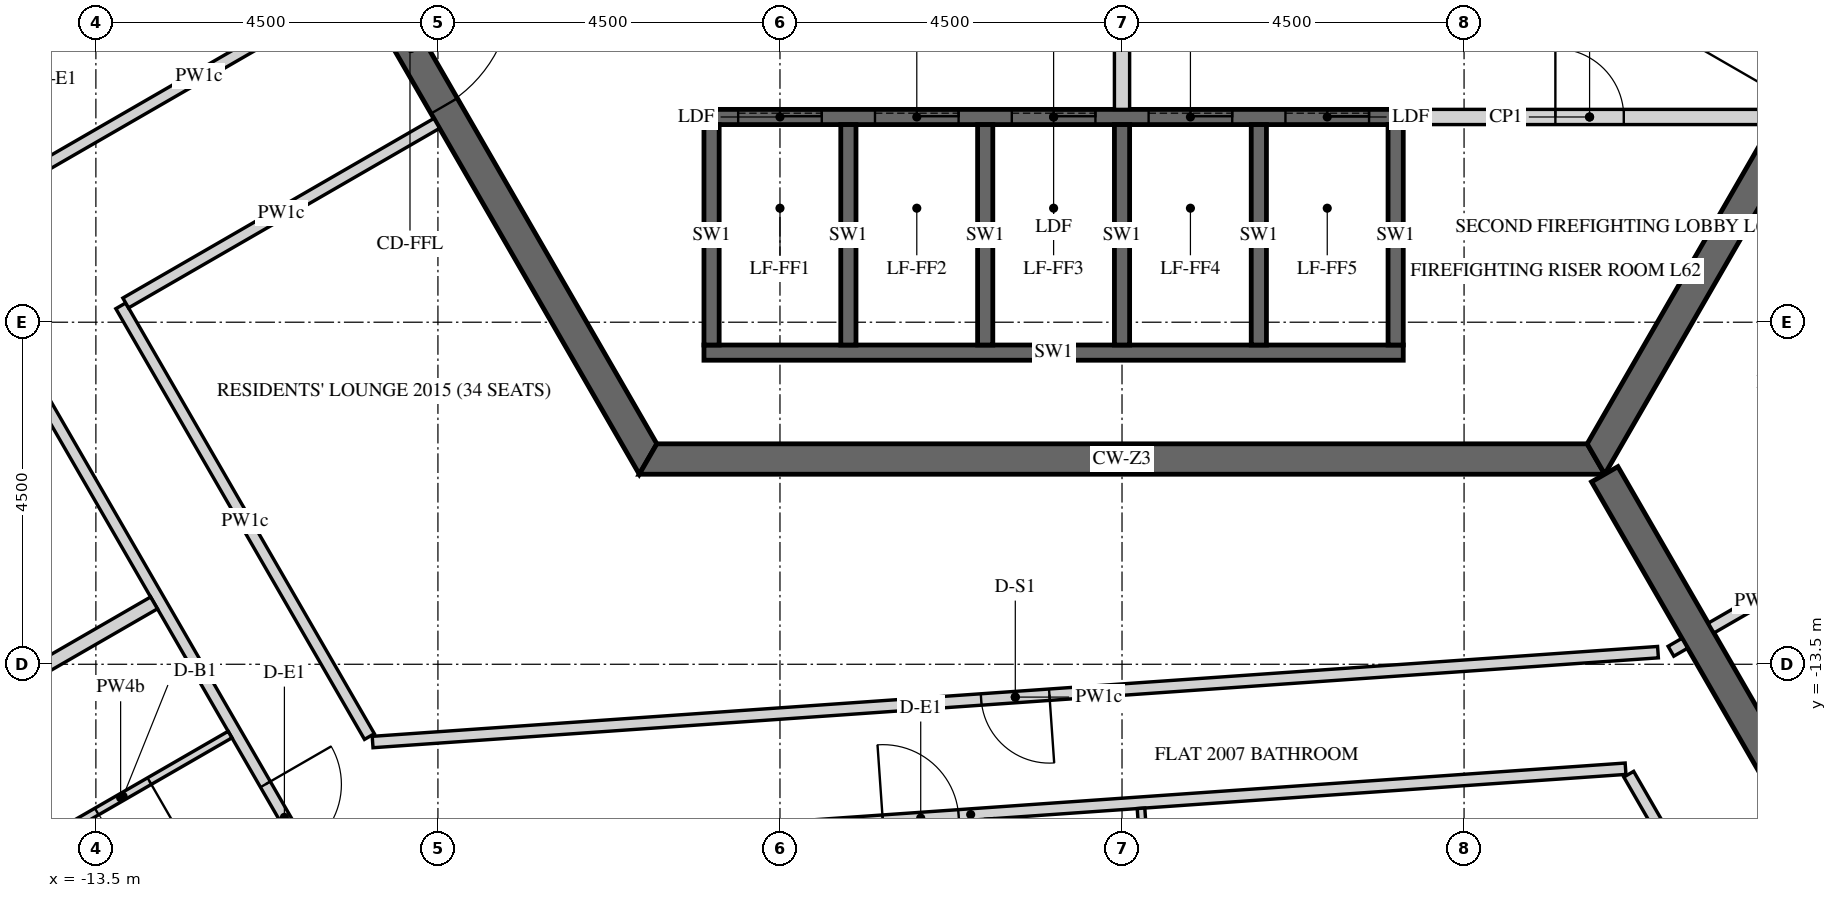
"""IFC4 building model, lengths in metres.
Left out: names, types, materials, properties, quantities, classifications, styles, units other than length and angle.
Written with IfcOpenShell. Run it as: python <this file> out.ifc"""

import sys

from ifc_helpers import new_model, si_unit, direction, frame, frame_2d, origin, place, context, subcontext, project, spatial, polyline, rectangle, outline, extrude, element, fill, save


model = new_model("IFC4")
c1 = context("Model", 3, precision=1e-05, world=origin(), true_north=direction((0.0, 1.0)))
c2 = subcontext(c1, "Body", "Model", "MODEL_VIEW")
j1 = project(units=[si_unit("LENGTHUNIT", "METRE"), si_unit("PLANEANGLEUNIT", "RADIAN")], contexts=[c1])
p1 = place(None, origin())
s1 = spatial("IfcSite", under=j1, at=p1, CompositionType="ELEMENT")
p2 = place(p1, origin())
s2 = spatial("IfcBuilding", under=s1, at=p2, CompositionType="ELEMENT")
p3 = place(p2, frame((0.0, 0.0, 260.1)))
s3 = spatial("IfcBuildingStorey", under=s2, at=p3, CompositionType="ELEMENT", Elevation=260.1)
p4 = place(p3, frame((-12.471, 0.0, -0.15), z_axis=(0.0, 0.0, 1.0), x_axis=(0.499996419489, -0.866027470984, 0.0)))
e1 = element("IfcWall", 1, at=p4, inside=s3, PredefinedType="SHEAR", context=c2, shape_type="SweptSolid", body=[
    extrude(outline(polyline([(-0.115, -0.2), (12.586, -0.2), (12.355, 0.2), (0.115, 0.2), (-0.115, -0.2)])), origin(), (0.0, 0.0, 1.0), 3.9),
])
p5 = place(p4, frame((5.306, 0.0, 0.15)))
e2 = element("IfcOpeningElement", 2, at=p5, cuts=e1, PredefinedType="OPENING", context=c2, shape_type="SweptSolid", body=[
    extrude(rectangle(XDim=1.8, YDim=2.4, at=frame_2d((0.9, 1.2))), frame((0.0, 0.21, 0.0), z_axis=(0.0, -1.0, 0.0), x_axis=(1.0, 0.0, 0.0)), (0.0, 0.0, 1.0), 0.42),
])
p6 = place(p3, frame((-6.235, -10.8, -0.15), z_axis=(0.0, 0.0, 1.0), x_axis=(1.0, 0.0, 0.0)))
e3 = element("IfcWall", 3, at=p6, inside=s3, PredefinedType="SHEAR", context=c2, shape_type="SweptSolid", body=[
    extrude(outline(polyline([(-0.115, -0.2), (12.586, -0.2), (12.355, 0.2), (0.115, 0.2), (-0.115, -0.2)])), origin(), (0.0, 0.0, 1.0), 3.9),
])
p7 = place(p3, frame((6.235, -10.8, -0.15), z_axis=(0.0, 0.0, 1.0), x_axis=(0.499996419489, 0.866027470984, 0.0)))
e4 = element("IfcWall", 4, at=p7, inside=s3, PredefinedType="SHEAR", context=c2, shape_type="SweptSolid", body=[
    extrude(outline(polyline([(-0.115, -0.2), (12.586, -0.2), (12.355, 0.2), (0.115, 0.2), (-0.115, -0.2)])), origin(), (0.0, 0.0, 1.0), 3.9),
])
p8 = place(p7, frame((5.364, 0.0, 0.15)))
e5 = element("IfcOpeningElement", 5, at=p8, cuts=e4, PredefinedType="OPENING", context=c2, shape_type="SweptSolid", body=[
    extrude(rectangle(XDim=1.8, YDim=2.4, at=frame_2d((0.9, 1.2))), frame((0.0, 0.21, 0.0), z_axis=(0.0, -1.0, 0.0), x_axis=(1.0, 0.0, 0.0)), (0.0, 0.0, 1.0), 0.42),
])
p9 = place(p3, frame((6.351, -11.0, -0.15), z_axis=(0.0, 0.0, 1.0), x_axis=(0.499998894578, -0.866026041999, 0.0)))
e6 = element("IfcWall", 6, at=p9, inside=s3, PredefinedType="SHEAR", context=c2, shape_type="SweptSolid", body=[
    extrude(rectangle(XDim=15.544, YDim=0.4, at=frame_2d((7.772, 0.0))), origin(), (0.0, 0.0, 1.0), 3.9),
])
p10 = place(p9, frame((6.872, 0.0, 0.15)))
e7 = element("IfcOpeningElement", 7, at=p10, cuts=e6, PredefinedType="OPENING", context=c2, shape_type="SweptSolid", body=[
    extrude(rectangle(XDim=1.8, YDim=2.4, at=frame_2d((0.9, 1.2))), frame((0.0, 0.21, 0.0), z_axis=(0.0, -1.0, 0.0), x_axis=(1.0, 0.0, 0.0)), (0.0, 0.0, 1.0), 0.42),
])
p11 = place(p3, frame((-5.5, -6.3, -0.25), z_axis=(0.0, 0.0, 1.0), x_axis=(1.0, 0.0, 0.0)))
e8 = element("IfcWall", 8, at=p11, inside=s3, PredefinedType="SHEAR", context=c2, shape_type="SweptSolid", body=[
    extrude(rectangle(XDim=9.2, YDim=0.2, at=frame_2d((4.6, 0.0))), origin(), (0.0, 0.0, 1.0), 3.9),
])
p12 = place(p11, frame((0.45, 0.0, 0.25)))
e9 = element("IfcOpeningElement", 9, at=p12, cuts=e8, PredefinedType="OPENING", context=c2, shape_type="SweptSolid", body=[
    extrude(rectangle(XDim=1.1, YDim=2.1, at=frame_2d((0.55, 1.05))), frame((0.0, 0.11, 0.0), z_axis=(0.0, -1.0, 0.0), x_axis=(1.0, 0.0, 0.0)), (0.0, 0.0, 1.0), 0.22),
])
p13 = place(p11, frame((2.25, 0.0, 0.25)))
e10 = element("IfcOpeningElement", 10, at=p13, cuts=e8, PredefinedType="OPENING", context=c2, shape_type="SweptSolid", body=[
    extrude(rectangle(XDim=1.1, YDim=2.1, at=frame_2d((0.55, 1.05))), frame((0.0, 0.11, 0.0), z_axis=(0.0, -1.0, 0.0), x_axis=(1.0, 0.0, 0.0)), (0.0, 0.0, 1.0), 0.22),
])
p14 = place(p11, frame((4.05, 0.0, 0.25)))
e11 = element("IfcOpeningElement", 11, at=p14, cuts=e8, PredefinedType="OPENING", context=c2, shape_type="SweptSolid", body=[
    extrude(rectangle(XDim=1.1, YDim=2.1, at=frame_2d((0.55, 1.05))), frame((0.0, 0.11, 0.0), z_axis=(0.0, -1.0, 0.0), x_axis=(1.0, 0.0, 0.0)), (0.0, 0.0, 1.0), 0.22),
])
p15 = place(p11, frame((5.85, 0.0, 0.25)))
e12 = element("IfcOpeningElement", 12, at=p15, cuts=e8, PredefinedType="OPENING", context=c2, shape_type="SweptSolid", body=[
    extrude(rectangle(XDim=1.1, YDim=2.1, at=frame_2d((0.55, 1.05))), frame((0.0, 0.11, 0.0), z_axis=(0.0, -1.0, 0.0), x_axis=(1.0, 0.0, 0.0)), (0.0, 0.0, 1.0), 0.22),
])
p16 = place(p11, frame((7.65, 0.0, 0.25)))
e13 = element("IfcOpeningElement", 13, at=p16, cuts=e8, PredefinedType="OPENING", context=c2, shape_type="SweptSolid", body=[
    extrude(rectangle(XDim=1.1, YDim=2.1, at=frame_2d((0.55, 1.05))), frame((0.0, 0.11, 0.0), z_axis=(0.0, -1.0, 0.0), x_axis=(1.0, 0.0, 0.0)), (0.0, 0.0, 1.0), 0.22),
])
p17 = place(p3, frame((-5.5, -9.4, -0.25), z_axis=(0.0, 0.0, 1.0), x_axis=(1.0, 0.0, 0.0)))
e14 = element("IfcWall", 14, at=p17, inside=s3, PredefinedType="SHEAR", context=c2, shape_type="SweptSolid", body=[
    extrude(rectangle(XDim=9.2, YDim=0.2, at=frame_2d((4.6, 0.0))), origin(), (0.0, 0.0, 1.0), 3.9),
])
for number, where, z_axis, x_axis in (
    (15, (-5.4, -9.3, -0.25), (0.0, 0.0, 1.0), (0.0, 1.0, 0.0)),
    (16, (-3.6, -9.3, -0.25), (0.0, 0.0, 1.0), (0.0, 1.0, 0.0)),
    (17, (-1.8, -9.3, -0.25), (0.0, 0.0, 1.0), (0.0, 1.0, 0.0)),
    (18, (0.0, -9.3, -0.25), (0.0, 0.0, 1.0), (0.0, 1.0, 0.0)),
    (19, (1.8, -9.3, -0.25), (0.0, 0.0, 1.0), (0.0, 1.0, 0.0)),
    (20, (3.6, -9.3, -0.25), (0.0, 0.0, 1.0), (0.0, 1.0, 0.0)),
):
    element("IfcWall", number, at=place(p3, frame(where, z_axis=z_axis, x_axis=x_axis)), inside=s3, PredefinedType="SHEAR", context=c2, shape_type="SweptSolid", body=[
        extrude(rectangle(XDim=2.9, YDim=0.2, at=frame_2d((1.45, 0.0))), origin(), (0.0, 0.0, 1.0), 3.9),
    ])
p18 = place(p3, frame((0.0, -6.2, 0.0), z_axis=(0.0, 0.0, 1.0), x_axis=(0.0, 1.0, 0.0)))
e21 = element("IfcWall", 21, at=p18, inside=s3, PredefinedType="PARTITIONING", context=c2, shape_type="SweptSolid", body=[
    extrude(rectangle(XDim=6.1, YDim=0.2, at=frame_2d((3.05, 0.0))), origin(), (0.0, 0.0, 1.0), 3.65),
])
p19 = place(p3, frame((3.7, -6.3, 0.0), z_axis=(0.0, 0.0, 1.0), x_axis=(1.0, 0.0, 0.0)))
e22 = element("IfcWall", 22, at=p19, inside=s3, PredefinedType="PARTITIONING", context=c2, shape_type="SweptSolid", body=[
    extrude(rectangle(XDim=4.903, YDim=0.2, at=frame_2d((2.451, 0.0))), origin(), (0.0, 0.0, 1.0), 3.65),
])
p20 = place(p19, frame((2.001, 0.0, 0.0)))
e23 = element("IfcOpeningElement", 23, at=p20, cuts=e22, PredefinedType="OPENING", context=c2, shape_type="SweptSolid", body=[
    extrude(rectangle(XDim=0.9, YDim=2.1, at=frame_2d((0.45, 1.05))), frame((0.0, 0.11, 0.0), z_axis=(0.0, -1.0, 0.0), x_axis=(1.0, 0.0, 0.0)), (0.0, 0.0, 1.0), 0.22),
])
p21 = place(p3, frame((-18.338, -2.838, 0.0), z_axis=(0.0, 0.0, 1.0), x_axis=(0.499999693481, -0.866025580753, 0.0)))
e24 = element("IfcWall", 24, at=p21, inside=s3, PredefinedType="PARTITIONING", context=c2, shape_type="SweptSolid", body=[
    extrude(rectangle(XDim=15.296, YDim=0.15, at=frame_2d((7.648, 0.0))), origin(), (0.0, 0.0, 1.0), 2.823),
])
p22 = place(p21, frame((2.925, 0.0, 0.0)))
e25 = element("IfcOpeningElement", 25, at=p22, cuts=e24, PredefinedType="OPENING", context=c2, shape_type="SweptSolid", body=[
    extrude(rectangle(XDim=1.0, YDim=2.1, at=frame_2d((0.5, 1.05))), frame((0.0, 0.085, 0.0), z_axis=(0.0, -1.0, 0.0), x_axis=(1.0, 0.0, 0.0)), (0.0, 0.0, 1.0), 0.17),
])
p23 = place(p21, frame((14.136, 0.0, 0.0)))
e26 = element("IfcOpeningElement", 26, at=p23, cuts=e24, PredefinedType="OPENING", context=c2, shape_type="SweptSolid", body=[
    extrude(rectangle(XDim=1.0, YDim=2.1, at=frame_2d((0.5, 1.05))), frame((0.0, 0.085, 0.0), z_axis=(0.0, -1.0, 0.0), x_axis=(1.0, 0.0, 0.0)), (0.0, 0.0, 1.0), 0.17),
])
p24 = place(p3, frame((-10.606, -16.079, 0.0), z_axis=(0.0, 0.0, 1.0), x_axis=(0.997563356349, 0.069766396426, 0.0)))
e27 = element("IfcWall", 27, at=p24, inside=s3, PredefinedType="PARTITIONING", context=c2, shape_type="SweptSolid", body=[
    extrude(rectangle(XDim=17.273, YDim=0.15, at=frame_2d((8.636, 0.0))), origin(), (0.0, 0.0, 1.0), 2.823),
])
p25 = place(p24, frame((7.478, 0.0, 0.0)))
e28 = element("IfcOpeningElement", 28, at=p25, cuts=e27, PredefinedType="OPENING", context=c2, shape_type="SweptSolid", body=[
    extrude(rectangle(XDim=1.0, YDim=2.1, at=frame_2d((0.5, 1.05))), frame((0.0, 0.085, 0.0), z_axis=(0.0, -1.0, 0.0), x_axis=(1.0, 0.0, 0.0)), (0.0, 0.0, 1.0), 0.17),
])
p26 = place(p3, frame((6.666, -14.946, 0.0), z_axis=(0.0, 0.0, 1.0), x_axis=(0.499979539361, -0.866037216418, 0.0)))
e29 = element("IfcWall", 29, at=p26, inside=s3, PredefinedType="PARTITIONING", context=c2, shape_type="SweptSolid", body=[
    extrude(rectangle(XDim=7.097, YDim=0.15, at=frame_2d((3.548, 0.0))), origin(), (0.0, 0.0, 1.0), 2.823),
])
p27 = place(p3, frame((-10.066, -4.566, 0.0), z_axis=(0.0, 0.0, 1.0), x_axis=(-0.866037363387, -0.499979284789, 0.0)))
e30 = element("IfcWall", 30, at=p27, inside=s3, PredefinedType="PARTITIONING", context=c2, shape_type="SweptSolid", body=[
    extrude(rectangle(XDim=4.8, YDim=0.15, at=frame_2d((2.4, 0.0))), origin(), (0.0, 0.0, 1.0), 2.823),
])
p28 = place(p3, frame((7.404, -13.224, 0.0), z_axis=(0.0, 0.0, 1.0), x_axis=(-0.866088799389, -0.499890179513, 0.0)))
e31 = element("IfcWall", 31, at=p28, inside=s3, PredefinedType="PARTITIONING", context=c2, shape_type="SweptSolid", body=[
    extrude(rectangle(XDim=0.21, YDim=0.15, at=frame_2d((0.105, 0.0))), origin(), (0.0, 0.0, 1.0), 2.823),
])
p29 = place(p3, frame((7.051, -13.341, 0.0), z_axis=(0.0, 0.0, 1.0), x_axis=(-0.997563599815, -0.069762915103, 0.0)))
e32 = element("IfcWall", 32, at=p29, inside=s3, PredefinedType="PARTITIONING", context=c2, shape_type="SweptSolid", body=[
    extrude(rectangle(XDim=16.952, YDim=0.15, at=frame_2d((8.476, 0.0))), origin(), (0.0, 0.0, 1.0), 2.823),
])
p30 = place(p29, frame((8.026, 0.0, 0.0)))
e33 = element("IfcOpeningElement", 33, at=p30, cuts=e32, PredefinedType="OPENING", context=c2, shape_type="SweptSolid", body=[
    extrude(rectangle(XDim=0.9, YDim=2.1, at=frame_2d((0.45, 1.05))), frame((0.0, 0.085, 0.0), z_axis=(0.0, -1.0, 0.0), x_axis=(1.0, 0.0, 0.0)), (0.0, 0.0, 1.0), 0.17),
])
p31 = place(p3, frame((-9.901, -14.451, 0.0), z_axis=(0.0, 0.0, 1.0), x_axis=(-0.49999161165, 0.866030246746, 0.0)))
e34 = element("IfcWall", 34, at=p31, inside=s3, PredefinedType="PARTITIONING", context=c2, shape_type="SweptSolid", body=[
    extrude(rectangle(XDim=6.543, YDim=0.15, at=frame_2d((3.271, 0.0))), origin(), (0.0, 0.0, 1.0), 2.823),
])
p32 = place(p3, frame((-13.108, -8.747, 0.0), z_axis=(0.0, 0.0, 1.0), x_axis=(0.866024684746, 0.500001245408, 0.0)))
e35 = element("IfcWall", 35, at=p32, inside=s3, PredefinedType="PARTITIONING", context=c2, shape_type="SweptSolid", body=[
    extrude(rectangle(XDim=4.725, YDim=0.15, at=frame_2d((2.363, 0.0))), origin(), (0.0, 0.0, 1.0), 2.823),
])
p33 = place(p3, frame((8.984, -12.311, 0.0), z_axis=(0.0, 0.0, 1.0), x_axis=(-0.866020080793, -0.500009219579, 0.0)))
e36 = element("IfcWall", 36, at=p33, inside=s3, PredefinedType="PARTITIONING", context=c2, shape_type="SweptSolid", body=[
    extrude(rectangle(XDim=1.425, YDim=0.15, at=frame_2d((0.712, 0.0))), origin(), (0.0, 0.0, 1.0), 2.823),
])
p34 = place(p3, frame((-19.771, -16.755, 0.0), z_axis=(0.0, 0.0, 1.0), x_axis=(0.866022959057, 0.500004234368, 0.0)))
e37 = element("IfcWall", 37, at=p34, inside=s3, PredefinedType="PARTITIONING", context=c2, shape_type="SweptSolid", body=[
    extrude(rectangle(XDim=8.125, YDim=0.18, at=frame_2d((4.062, 0.0))), origin(), (0.0, 0.0, 1.0), 2.823),
])
p35 = place(p3, frame((-11.735, -14.425, 0.0), z_axis=(0.0, 0.0, 1.0), x_axis=(-0.866033959199, -0.499985181294, 0.0)))
e38 = element("IfcWall", 38, at=p35, inside=s3, PredefinedType="PARTITIONING", context=c2, shape_type="SweptSolid", body=[
    extrude(rectangle(XDim=3.325, YDim=0.1, at=frame_2d((1.662, 0.0))), origin(), (0.0, 0.0, 1.0), 2.823),
])
p36 = place(p35, frame((1.225, 0.0, 0.0)))
e39 = element("IfcOpeningElement", 39, at=p36, cuts=e38, PredefinedType="OPENING", context=c2, shape_type="SweptSolid", body=[
    extrude(rectangle(XDim=0.8, YDim=2.1, at=frame_2d((0.4, 1.05))), frame((0.0, 0.06, 0.0), z_axis=(0.0, -1.0, 0.0), x_axis=(1.0, 0.0, 0.0)), (0.0, 0.0, 1.0), 0.12),
])
p37 = place(p3, frame((0.25, -15.395, 0.0), z_axis=(0.0, 0.0, 1.0), x_axis=(0.069754598287, -0.997564181403, 0.0)))
e40 = element("IfcWall", 40, at=p37, inside=s3, PredefinedType="PARTITIONING", context=c2, shape_type="SweptSolid", body=[
    extrude(rectangle(XDim=3.325, YDim=0.1, at=frame_2d((1.663, 0.0))), origin(), (0.0, 0.0, 1.0), 2.823),
])
p38 = place(p5, origin())
e41 = element("IfcDoor", 41, at=p38, inside=s3, OperationType="DOUBLE_DOOR_SINGLE_SWING", PredefinedType="DOOR", context=c2, shape_type="SweptSolid", body=[
    extrude(rectangle(XDim=1.8, YDim=2.4, at=frame_2d((0.9, 1.2))), frame((0.0, 0.025, 0.0), z_axis=(0.0, -1.0, 0.0), x_axis=(1.0, 0.0, 0.0)), (0.0, 0.0, 1.0), 0.05),
])
fill(e2, e41)
p39 = place(p20, origin())
e42 = element("IfcDoor", 42, at=p39, inside=s3, OperationType="SINGLE_SWING_LEFT", PredefinedType="DOOR", context=c2, shape_type="SweptSolid", body=[
    extrude(rectangle(XDim=0.9, YDim=2.1, at=frame_2d((0.45, 1.05))), frame((0.0, 0.025, 0.0), z_axis=(0.0, -1.0, 0.0), x_axis=(1.0, 0.0, 0.0)), (0.0, 0.0, 1.0), 0.05),
])
fill(e23, e42)
p40 = place(p12, origin())
e43 = element("IfcDoor", 43, at=p40, inside=s3, OperationType="SLIDING_TO_LEFT", PredefinedType="DOOR", context=c2, shape_type="SweptSolid", body=[
    extrude(rectangle(XDim=1.1, YDim=2.1, at=frame_2d((0.55, 1.05))), frame((0.0, 0.025, 0.0), z_axis=(0.0, -1.0, 0.0), x_axis=(1.0, 0.0, 0.0)), (0.0, 0.0, 1.0), 0.05),
])
fill(e9, e43)
p41 = place(p13, origin())
e44 = element("IfcDoor", 44, at=p41, inside=s3, OperationType="SLIDING_TO_LEFT", PredefinedType="DOOR", context=c2, shape_type="SweptSolid", body=[
    extrude(rectangle(XDim=1.1, YDim=2.1, at=frame_2d((0.55, 1.05))), frame((0.0, 0.025, 0.0), z_axis=(0.0, -1.0, 0.0), x_axis=(1.0, 0.0, 0.0)), (0.0, 0.0, 1.0), 0.05),
])
fill(e10, e44)
p42 = place(p14, origin())
e45 = element("IfcDoor", 45, at=p42, inside=s3, OperationType="SLIDING_TO_LEFT", PredefinedType="DOOR", context=c2, shape_type="SweptSolid", body=[
    extrude(rectangle(XDim=1.1, YDim=2.1, at=frame_2d((0.55, 1.05))), frame((0.0, 0.025, 0.0), z_axis=(0.0, -1.0, 0.0), x_axis=(1.0, 0.0, 0.0)), (0.0, 0.0, 1.0), 0.05),
])
fill(e11, e45)
p43 = place(p15, origin())
e46 = element("IfcDoor", 46, at=p43, inside=s3, OperationType="SLIDING_TO_LEFT", PredefinedType="DOOR", context=c2, shape_type="SweptSolid", body=[
    extrude(rectangle(XDim=1.1, YDim=2.1, at=frame_2d((0.55, 1.05))), frame((0.0, 0.025, 0.0), z_axis=(0.0, -1.0, 0.0), x_axis=(1.0, 0.0, 0.0)), (0.0, 0.0, 1.0), 0.05),
])
fill(e12, e46)
p44 = place(p16, origin())
e47 = element("IfcDoor", 47, at=p44, inside=s3, OperationType="SLIDING_TO_LEFT", PredefinedType="DOOR", context=c2, shape_type="SweptSolid", body=[
    extrude(rectangle(XDim=1.1, YDim=2.1, at=frame_2d((0.55, 1.05))), frame((0.0, 0.025, 0.0), z_axis=(0.0, -1.0, 0.0), x_axis=(1.0, 0.0, 0.0)), (0.0, 0.0, 1.0), 0.05),
])
fill(e13, e47)
p45 = place(p23, origin())
e48 = element("IfcDoor", 48, at=p45, inside=s3, OperationType="SINGLE_SWING_LEFT", PredefinedType="DOOR", context=c2, shape_type="SweptSolid", body=[
    extrude(rectangle(XDim=1.0, YDim=2.1, at=frame_2d((0.5, 1.05))), frame((0.0, 0.025, 0.0), z_axis=(0.0, -1.0, 0.0), x_axis=(1.0, 0.0, 0.0)), (0.0, 0.0, 1.0), 0.05),
])
fill(e26, e48)
p46 = place(p36, origin())
e49 = element("IfcDoor", 49, at=p46, inside=s3, OperationType="SINGLE_SWING_RIGHT", PredefinedType="DOOR", context=c2, shape_type="SweptSolid", body=[
    extrude(rectangle(XDim=0.8, YDim=2.1, at=frame_2d((0.4, 1.05))), frame((0.0, 0.025, 0.0), z_axis=(0.0, -1.0, 0.0), x_axis=(1.0, 0.0, 0.0)), (0.0, 0.0, 1.0), 0.05),
])
fill(e39, e49)
p47 = place(p25, origin())
e50 = element("IfcDoor", 50, at=p47, inside=s3, OperationType="SINGLE_SWING_RIGHT", PredefinedType="DOOR", context=c2, shape_type="SweptSolid", body=[
    extrude(rectangle(XDim=1.0, YDim=2.1, at=frame_2d((0.5, 1.05))), frame((0.0, 0.025, 0.0), z_axis=(0.0, -1.0, 0.0), x_axis=(1.0, 0.0, 0.0)), (0.0, 0.0, 1.0), 0.05),
])
fill(e28, e50)
p48 = place(p30, origin())
e51 = element("IfcDoor", 51, at=p48, inside=s3, OperationType="SINGLE_SWING_LEFT", PredefinedType="DOOR", context=c2, shape_type="SweptSolid", body=[
    extrude(rectangle(XDim=0.9, YDim=2.1, at=frame_2d((0.45, 1.05))), frame((0.0, 0.025, 0.0), z_axis=(0.0, -1.0, 0.0), x_axis=(1.0, 0.0, 0.0)), (0.0, 0.0, 1.0), 0.05),
])
fill(e33, e51)
save(model, sys.argv[1])
